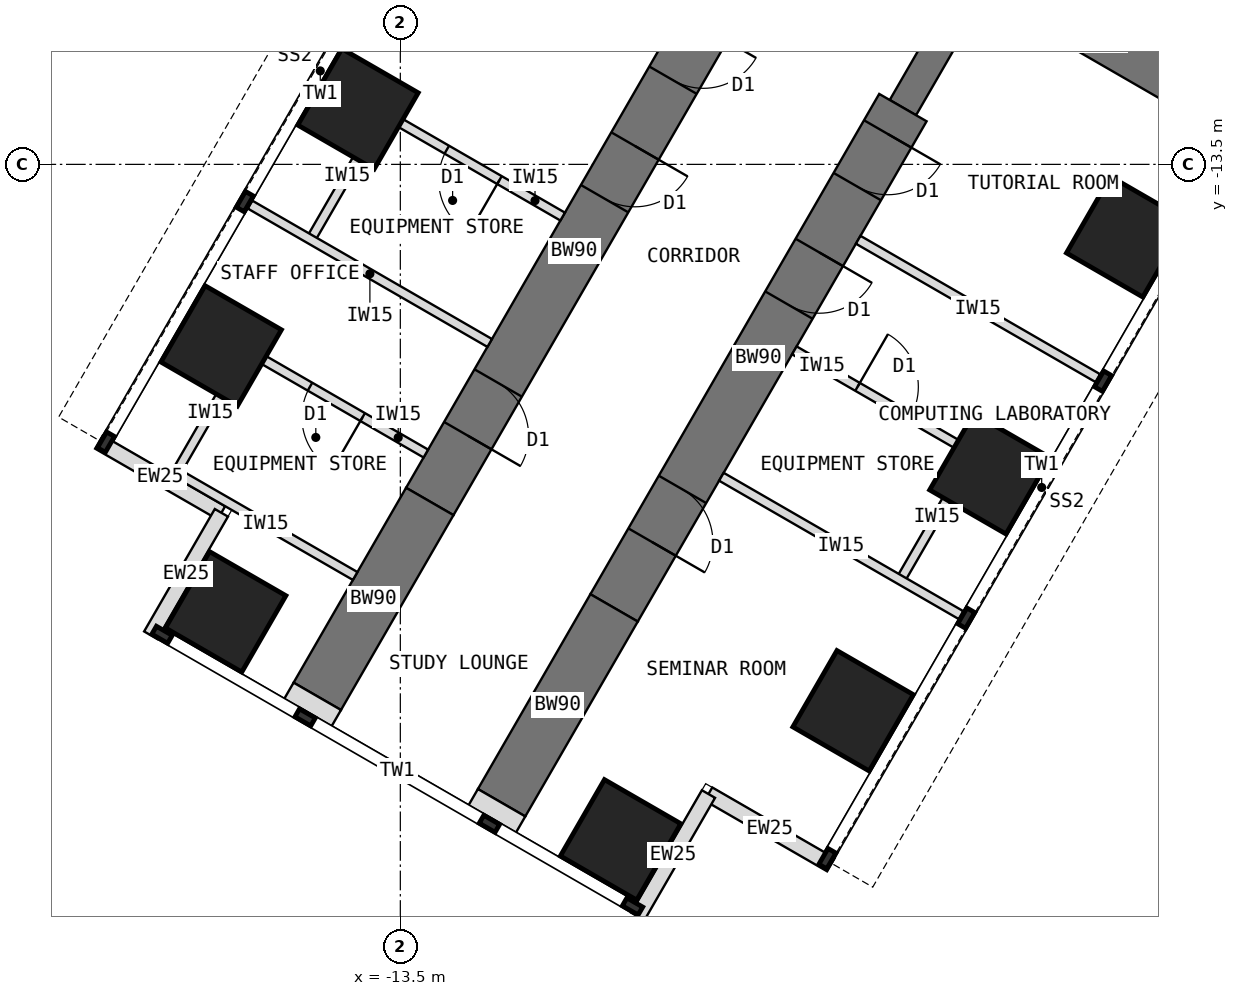
"""IFC4 building model, lengths in metres.
Left out: names, types, materials, properties, quantities, classifications, styles, units other than length and angle.
Written with IfcOpenShell. Run it as: python <this file> out.ifc"""

import sys

from ifc_helpers import new_model, si_unit, direction, frame, frame_2d, origin, origin_2d, place, context, subcontext, project, spatial, rectangle, extrude, element, fill, save


model = new_model("IFC4")
c1 = context("Model", 3, precision=1e-05, world=origin(), true_north=direction((0.0, 1.0)))
c2 = subcontext(c1, "Body", "Model", "MODEL_VIEW")
j1 = project(units=[si_unit("LENGTHUNIT", "METRE"), si_unit("PLANEANGLEUNIT", "RADIAN")], contexts=[c1])
p1 = place(None, origin())
s1 = spatial("IfcSite", under=j1, at=p1, CompositionType="ELEMENT")
p2 = place(p1, origin())
s2 = spatial("IfcBuilding", under=s1, at=p2, CompositionType="ELEMENT")
p3 = place(p2, frame((0.0, 0.0, 68.5)))
s3 = spatial("IfcBuildingStorey", under=s2, at=p3, CompositionType="ELEMENT", Elevation=68.5)
p4 = place(p3, frame((-3.939, -10.322, 0.0), z_axis=(0.0, 0.0, 1.0), x_axis=(0.866011268655, -0.500024481964, 0.0)))
e1 = element("IfcWall", 1, at=p4, inside=s3, PredefinedType="SHEAR", context=c2, shape_type="SweptSolid", body=[
    extrude(rectangle(XDim=4.548, YDim=0.7, at=frame_2d((2.274, 0.0))), origin(), (0.0, 0.0, 1.0), 4.0),
])
p5 = place(p3, frame((-3.939, -10.322, 0.0), z_axis=(0.0, 0.0, 1.0), x_axis=(-0.499918158782, -0.866072649678, 0.0)))
e2 = element("IfcWall", 2, at=p5, inside=s3, PredefinedType="SHEAR", context=c2, shape_type="SweptSolid", body=[
    extrude(rectangle(XDim=2.592, YDim=0.5, at=frame_2d((1.296, 0.0))), origin(), (0.0, 0.0, 1.0), 4.0),
])
p6 = place(p3, frame((-5.234, -12.566, 0.0), z_axis=(0.0, 0.0, 1.0), x_axis=(-0.499997557548, -0.86602681393, 0.0)))
e3 = element("IfcWall", 3, at=p6, inside=s3, PredefinedType="SHEAR", context=c2, shape_type="SweptSolid", body=[
    extrude(rectangle(XDim=9.5, YDim=0.9, at=frame_2d((4.75, 0.0))), origin(), (0.0, 0.0, 1.0), 4.0),
])
p7 = place(p6, frame((0.5, 0.0, 0.0)))
e4 = element("IfcOpeningElement", 4, at=p7, cuts=e3, PredefinedType="OPENING", context=c2, shape_type="SweptSolid", body=[
    extrude(rectangle(XDim=1.0, YDim=2.1, at=frame_2d((0.5, 1.05))), frame((0.0, 0.46, 0.0), z_axis=(0.0, -1.0, 0.0), x_axis=(1.0, 0.0, 0.0)), (0.0, 0.0, 1.0), 0.92),
])
p8 = place(p6, frame((2.75, 0.0, 0.0)))
e5 = element("IfcOpeningElement", 5, at=p8, cuts=e3, PredefinedType="OPENING", context=c2, shape_type="SweptSolid", body=[
    extrude(rectangle(XDim=1.0, YDim=2.1, at=frame_2d((0.5, 1.05))), frame((0.0, 0.46, 0.0), z_axis=(0.0, -1.0, 0.0), x_axis=(1.0, 0.0, 0.0)), (0.0, 0.0, 1.0), 0.92),
])
p9 = place(p6, frame((7.25, 0.0, 0.0)))
e6 = element("IfcOpeningElement", 6, at=p9, cuts=e3, PredefinedType="OPENING", context=c2, shape_type="SweptSolid", body=[
    extrude(rectangle(XDim=1.0, YDim=2.1, at=frame_2d((0.5, 1.05))), frame((0.0, 0.46, 0.0), z_axis=(0.0, -1.0, 0.0), x_axis=(1.0, 0.0, 0.0)), (0.0, 0.0, 1.0), 0.92),
])
p10 = place(p3, frame((-9.984, -20.794, 0.0), z_axis=(0.0, 0.0, 1.0), x_axis=(-0.500042316284, -0.866000971088, 0.0)))
e7 = element("IfcWall", 7, at=p10, inside=s3, PredefinedType="SHEAR", context=c2, shape_type="SweptSolid", body=[
    extrude(rectangle(XDim=3.7, YDim=0.9, at=frame_2d((1.85, 0.0))), origin(), (0.0, 0.0, 1.0), 4.0),
])
p11 = place(p3, frame((-8.266, -10.816, 0.0), z_axis=(0.0, 0.0, 1.0), x_axis=(-0.499997557548, -0.86602681393, 0.0)))
e8 = element("IfcWall", 8, at=p11, inside=s3, PredefinedType="SHEAR", context=c2, shape_type="SweptSolid", body=[
    extrude(rectangle(XDim=9.5, YDim=0.9, at=frame_2d((4.75, 0.0))), origin(), (0.0, 0.0, 1.0), 4.0),
])
p12 = place(p11, frame((0.5, 0.0, 0.0)))
e9 = element("IfcOpeningElement", 9, at=p12, cuts=e8, PredefinedType="OPENING", context=c2, shape_type="SweptSolid", body=[
    extrude(rectangle(XDim=1.0, YDim=2.1, at=frame_2d((0.5, 1.05))), frame((0.0, 0.46, 0.0), z_axis=(0.0, -1.0, 0.0), x_axis=(1.0, 0.0, 0.0)), (0.0, 0.0, 1.0), 0.92),
])
p13 = place(p11, frame((2.75, 0.0, 0.0)))
e10 = element("IfcOpeningElement", 10, at=p13, cuts=e8, PredefinedType="OPENING", context=c2, shape_type="SweptSolid", body=[
    extrude(rectangle(XDim=1.0, YDim=2.1, at=frame_2d((0.5, 1.05))), frame((0.0, 0.46, 0.0), z_axis=(0.0, -1.0, 0.0), x_axis=(1.0, 0.0, 0.0)), (0.0, 0.0, 1.0), 0.92),
])
p14 = place(p11, frame((7.25, 0.0, 0.0)))
e11 = element("IfcOpeningElement", 11, at=p14, cuts=e8, PredefinedType="OPENING", context=c2, shape_type="SweptSolid", body=[
    extrude(rectangle(XDim=1.0, YDim=2.1, at=frame_2d((0.5, 1.05))), frame((0.0, 0.46, 0.0), z_axis=(0.0, -1.0, 0.0), x_axis=(1.0, 0.0, 0.0)), (0.0, 0.0, 1.0), 0.92),
])
p15 = place(p3, frame((-13.016, -19.044, 0.0), z_axis=(0.0, 0.0, 1.0), x_axis=(-0.499992827086, -0.866029545028, 0.0)))
e12 = element("IfcWall", 12, at=p15, inside=s3, PredefinedType="SHEAR", context=c2, shape_type="SweptSolid", body=[
    extrude(rectangle(XDim=3.7, YDim=0.9, at=frame_2d((1.85, 0.0))), origin(), (0.0, 0.0, 1.0), 4.0),
])
for number, where, z_axis, x_axis in (
    (13, (-1.554, -14.691, 0.0), (0.0, 0.0, 1.0), (0.5, 0.866, 0.0)),
    (14, (-3.804, -18.588, 0.0), (0.0, 0.0, 1.0), (0.5, 0.866, 0.0)),
    (15, (-14.196, -12.588, 0.0), (0.0, 0.0, 1.0), (0.5, 0.866, 0.0)),
    (16, (-6.054, -22.486, 0.0), (0.0, 0.0, 1.0), (0.5, 0.866, 0.0)),
    (17, (-16.446, -16.486, 0.0), (0.0, 0.0, 1.0), (0.5, 0.866, 0.0)),
    (18, (-9.877, -24.608, 0.0), (0.0, 0.0, 1.0), (0.5, 0.866, 0.0)),
    (19, (-16.373, -20.858, 0.0), (0.0, 0.0, 1.0), (0.5, 0.866, 0.0)),
):
    element("IfcColumn", number, at=place(p3, frame(where, z_axis=z_axis, x_axis=x_axis)), inside=s3, PredefinedType="COLUMN", context=c2, shape_type="SweptSolid", body=[
        extrude(rectangle(XDim=1.45, YDim=1.45, at=origin_2d()), origin(), (0.0, 0.0, 1.0), 4.0),
    ])
for number, where, z_axis, x_axis in (
    (20, (-6.419, -25.017, 0.0), (0.0, 0.0, 1.0), (-0.866, 0.5, 0.0)),
    (21, (-8.432, -23.855, 0.0), (0.0, 0.0, 1.0), (-0.5, -0.866, 0.0)),
    (22, (-18.456, -18.067, 0.0), (0.0, 0.0, 1.0), (0.866, -0.5, 0.0)),
    (23, (-16.443, -19.23, 0.0), (0.0, 0.0, 1.0), (-0.5, -0.866, 0.0)),
):
    element("IfcWall", number, at=place(p3, frame(where, z_axis=z_axis, x_axis=x_axis)), inside=s3, PredefinedType="STANDARD", context=c2, shape_type="SweptSolid", body=[
        extrude(rectangle(XDim=2.325, YDim=0.25, at=frame_2d((1.163, 0.0))), origin(), (0.0, 0.0, 1.0), 3.8),
    ])
for number, where, z_axis, x_axis in (
    (24, (-11.834, -23.998, 0.0), (0.0, 0.0, 1.0), (-0.5, -0.866, 0.0)),
    (25, (-14.865, -22.248, 0.0), (0.0, 0.0, 1.0), (-0.5, -0.866, 0.0)),
):
    element("IfcWall", number, at=place(p3, frame(where, z_axis=z_axis, x_axis=x_axis)), inside=s3, PredefinedType="PARTITIONING", context=c2, shape_type="SweptSolid", body=[
        extrude(rectangle(XDim=0.31, YDim=0.9, at=frame_2d((0.155, 0.0))), origin(), (0.0, 0.0, 1.0), 3.8),
    ])
for number, where, z_axis, x_axis in (
    (26, (-5.97, -14.74, 0.0), (0.0, 0.0, 1.0), (0.866, -0.5, 0.0)),
    (27, (-8.22, -18.637, 0.0), (0.0, 0.0, 1.0), (0.866, -0.5, 0.0)),
):
    element("IfcWall", number, at=place(p3, frame(where, z_axis=z_axis, x_axis=x_axis)), inside=s3, PredefinedType="PARTITIONING", context=c2, shape_type="SweptSolid", body=[
        extrude(rectangle(XDim=4.55, YDim=0.15, at=frame_2d((2.275, 0.0))), origin(), (0.0, 0.0, 1.0), 3.8),
    ])
p16 = place(p3, frame((-4.075, -18.259, 0.0), z_axis=(0.0, 0.0, 1.0), x_axis=(-0.500001309137, -0.866024647952, 0.0)))
e28 = element("IfcWall", 28, at=p16, inside=s3, PredefinedType="PARTITIONING", context=c2, shape_type="SweptSolid", body=[
    extrude(rectangle(XDim=2.4, YDim=0.15, at=frame_2d((1.2, 0.0))), origin(), (0.0, 0.0, 1.0), 3.8),
])
p17 = place(p3, frame((-7.02, -16.559, 0.0), z_axis=(0.0, 0.0, 1.0), x_axis=(0.866038511948, -0.499977295307, 0.0)))
e29 = element("IfcWall", 29, at=p17, inside=s3, PredefinedType="PARTITIONING", context=c2, shape_type="SweptSolid", body=[
    extrude(rectangle(XDim=3.4, YDim=0.15, at=frame_2d((1.7, 0.0))), origin(), (0.0, 0.0, 1.0), 3.8),
])
p18 = place(p17, frame((1.2, 0.0, 0.0)))
e30 = element("IfcOpeningElement", 30, at=p18, cuts=e29, PredefinedType="OPENING", context=c2, shape_type="SweptSolid", body=[
    extrude(rectangle(XDim=1.0, YDim=2.1, at=frame_2d((0.5, 1.05))), frame((0.0, 0.085, 0.0), z_axis=(0.0, -1.0, 0.0), x_axis=(1.0, 0.0, 0.0)), (0.0, 0.0, 1.0), 0.17),
])
p19 = place(p3, frame((-12.03, -16.437, 0.0), z_axis=(0.0, 0.0, 1.0), x_axis=(-0.866035472144, 0.499982560684, 0.0)))
e31 = element("IfcWall", 31, at=p19, inside=s3, PredefinedType="PARTITIONING", context=c2, shape_type="SweptSolid", body=[
    extrude(rectangle(XDim=4.55, YDim=0.15, at=frame_2d((2.275, 0.0))), origin(), (0.0, 0.0, 1.0), 3.8),
])
p20 = place(p3, frame((-13.775, -12.658, 0.0), z_axis=(0.0, 0.0, 1.0), x_axis=(-0.500033551112, -0.866006032174, 0.0)))
e32 = element("IfcWall", 32, at=p20, inside=s3, PredefinedType="PARTITIONING", context=c2, shape_type="SweptSolid", body=[
    extrude(rectangle(XDim=2.4, YDim=0.15, at=frame_2d((1.2, 0.0))), origin(), (0.0, 0.0, 1.0), 3.8),
])
p21 = place(p3, frame((-10.83, -14.359, 0.0), z_axis=(0.0, 0.0, 1.0), x_axis=(-0.865989465428, 0.500062241894, 0.0)))
e33 = element("IfcWall", 33, at=p21, inside=s3, PredefinedType="PARTITIONING", context=c2, shape_type="SweptSolid", body=[
    extrude(rectangle(XDim=3.4, YDim=0.15, at=frame_2d((1.7, 0.0))), origin(), (0.0, 0.0, 1.0), 3.8),
])
p22 = place(p21, frame((1.2, 0.0, 0.0)))
e34 = element("IfcOpeningElement", 34, at=p22, cuts=e33, PredefinedType="OPENING", context=c2, shape_type="SweptSolid", body=[
    extrude(rectangle(XDim=1.0, YDim=2.1, at=frame_2d((0.5, 1.05))), frame((0.0, 0.085, 0.0), z_axis=(0.0, -1.0, 0.0), x_axis=(1.0, 0.0, 0.0)), (0.0, 0.0, 1.0), 0.17),
])
p23 = place(p3, frame((-16.025, -16.556, 0.0), z_axis=(0.0, 0.0, 1.0), x_axis=(-0.500077600433, -0.865980596518, 0.0)))
e35 = element("IfcWall", 35, at=p23, inside=s3, PredefinedType="PARTITIONING", context=c2, shape_type="SweptSolid", body=[
    extrude(rectangle(XDim=2.4, YDim=0.15, at=frame_2d((1.2, 0.0))), origin(), (0.0, 0.0, 1.0), 3.8),
])
p24 = place(p3, frame((-13.08, -18.256, 0.0), z_axis=(0.0, 0.0, 1.0), x_axis=(-0.866020560687, 0.500008388397, 0.0)))
e36 = element("IfcWall", 36, at=p24, inside=s3, PredefinedType="PARTITIONING", context=c2, shape_type="SweptSolid", body=[
    extrude(rectangle(XDim=3.4, YDim=0.15, at=frame_2d((1.7, 0.0))), origin(), (0.0, 0.0, 1.0), 3.8),
])
p25 = place(p24, frame((1.2, 0.0, 0.0)))
e37 = element("IfcOpeningElement", 37, at=p25, cuts=e36, PredefinedType="OPENING", context=c2, shape_type="SweptSolid", body=[
    extrude(rectangle(XDim=1.0, YDim=2.1, at=frame_2d((0.5, 1.05))), frame((0.0, 0.085, 0.0), z_axis=(0.0, -1.0, 0.0), x_axis=(1.0, 0.0, 0.0)), (0.0, 0.0, 1.0), 0.17),
])
p26 = place(p3, frame((-14.243, -20.269, 0.0), z_axis=(0.0, 0.0, 1.0), x_axis=(-0.866007419912, 0.500031147688, 0.0)))
e38 = element("IfcWall", 38, at=p26, inside=s3, PredefinedType="PARTITIONING", context=c2, shape_type="SweptSolid", body=[
    extrude(rectangle(XDim=3.4, YDim=0.15, at=frame_2d((1.7, 0.0))), origin(), (0.0, 0.0, 1.0), 3.8),
])
p27 = place(p18, origin())
e39 = element("IfcDoor", 39, at=p27, inside=s3, OperationType="SINGLE_SWING_LEFT", PredefinedType="DOOR", context=c2, shape_type="SweptSolid", body=[
    extrude(rectangle(XDim=1.0, YDim=2.1, at=frame_2d((0.5, 1.05))), frame((0.0, 0.025, 0.0), z_axis=(0.0, -1.0, 0.0), x_axis=(1.0, 0.0, 0.0)), (0.0, 0.0, 1.0), 0.05),
])
fill(e30, e39)
p28 = place(p22, origin())
e40 = element("IfcDoor", 40, at=p28, inside=s3, OperationType="SINGLE_SWING_LEFT", PredefinedType="DOOR", context=c2, shape_type="SweptSolid", body=[
    extrude(rectangle(XDim=1.0, YDim=2.1, at=frame_2d((0.5, 1.05))), frame((0.0, 0.025, 0.0), z_axis=(0.0, -1.0, 0.0), x_axis=(1.0, 0.0, 0.0)), (0.0, 0.0, 1.0), 0.05),
])
fill(e34, e40)
p29 = place(p25, origin())
e41 = element("IfcDoor", 41, at=p29, inside=s3, OperationType="SINGLE_SWING_LEFT", PredefinedType="DOOR", context=c2, shape_type="SweptSolid", body=[
    extrude(rectangle(XDim=1.0, YDim=2.1, at=frame_2d((0.5, 1.05))), frame((0.0, 0.025, 0.0), z_axis=(0.0, -1.0, 0.0), x_axis=(1.0, 0.0, 0.0)), (0.0, 0.0, 1.0), 0.05),
])
fill(e37, e41)
p30 = place(p7, origin())
e42 = element("IfcDoor", 42, at=p30, inside=s3, OperationType="SINGLE_SWING_LEFT", PredefinedType="DOOR", context=c2, shape_type="SweptSolid", body=[
    extrude(rectangle(XDim=0.92, YDim=2.06, at=frame_2d((0.5, 1.03))), frame((0.0, 0.025, 0.0), z_axis=(0.0, -1.0, 0.0), x_axis=(1.0, 0.0, 0.0)), (0.0, 0.0, 1.0), 0.05),
    extrude(rectangle(XDim=0.04, YDim=2.1, at=frame_2d((0.02, 1.05))), frame((0.0, 0.45, 0.0), z_axis=(0.0, -1.0, 0.0), x_axis=(1.0, 0.0, 0.0)), (0.0, 0.0, 1.0), 0.899),
    extrude(rectangle(XDim=0.04, YDim=2.1, at=frame_2d((0.98, 1.05))), frame((0.0, 0.45, 0.0), z_axis=(0.0, -1.0, 0.0), x_axis=(1.0, 0.0, 0.0)), (0.0, 0.0, 1.0), 0.899),
    extrude(rectangle(XDim=0.92, YDim=0.04, at=frame_2d((0.5, 2.08))), frame((0.0, 0.45, 0.0), z_axis=(0.0, -1.0, 0.0), x_axis=(1.0, 0.0, 0.0)), (0.0, 0.0, 1.0), 0.899),
])
fill(e4, e42)
p31 = place(p8, origin())
e43 = element("IfcDoor", 43, at=p31, inside=s3, OperationType="SINGLE_SWING_LEFT", PredefinedType="DOOR", context=c2, shape_type="SweptSolid", body=[
    extrude(rectangle(XDim=0.92, YDim=2.06, at=frame_2d((0.5, 1.03))), frame((0.0, 0.025, 0.0), z_axis=(0.0, -1.0, 0.0), x_axis=(1.0, 0.0, 0.0)), (0.0, 0.0, 1.0), 0.05),
    extrude(rectangle(XDim=0.04, YDim=2.1, at=frame_2d((0.02, 1.05))), frame((0.0, 0.45, 0.0), z_axis=(0.0, -1.0, 0.0), x_axis=(1.0, 0.0, 0.0)), (0.0, 0.0, 1.0), 0.899),
    extrude(rectangle(XDim=0.04, YDim=2.1, at=frame_2d((0.98, 1.05))), frame((0.0, 0.45, 0.0), z_axis=(0.0, -1.0, 0.0), x_axis=(1.0, 0.0, 0.0)), (0.0, 0.0, 1.0), 0.899),
    extrude(rectangle(XDim=0.92, YDim=0.04, at=frame_2d((0.5, 2.08))), frame((0.0, 0.45, 0.0), z_axis=(0.0, -1.0, 0.0), x_axis=(1.0, 0.0, 0.0)), (0.0, 0.0, 1.0), 0.899),
])
fill(e5, e43)
p32 = place(p9, origin())
e44 = element("IfcDoor", 44, at=p32, inside=s3, OperationType="SINGLE_SWING_RIGHT", PredefinedType="DOOR", context=c2, shape_type="SweptSolid", body=[
    extrude(rectangle(XDim=0.92, YDim=2.06, at=frame_2d((0.5, 1.03))), frame((0.0, 0.025, 0.0), z_axis=(0.0, -1.0, 0.0), x_axis=(1.0, 0.0, 0.0)), (0.0, 0.0, 1.0), 0.05),
    extrude(rectangle(XDim=0.04, YDim=2.1, at=frame_2d((0.02, 1.05))), frame((0.0, 0.45, 0.0), z_axis=(0.0, -1.0, 0.0), x_axis=(1.0, 0.0, 0.0)), (0.0, 0.0, 1.0), 0.899),
    extrude(rectangle(XDim=0.04, YDim=2.1, at=frame_2d((0.98, 1.05))), frame((0.0, 0.45, 0.0), z_axis=(0.0, -1.0, 0.0), x_axis=(1.0, 0.0, 0.0)), (0.0, 0.0, 1.0), 0.899),
    extrude(rectangle(XDim=0.92, YDim=0.04, at=frame_2d((0.5, 2.08))), frame((0.0, 0.45, 0.0), z_axis=(0.0, -1.0, 0.0), x_axis=(1.0, 0.0, 0.0)), (0.0, 0.0, 1.0), 0.899),
])
fill(e6, e44)
p33 = place(p12, origin())
e45 = element("IfcDoor", 45, at=p33, inside=s3, OperationType="SINGLE_SWING_LEFT", PredefinedType="DOOR", context=c2, shape_type="SweptSolid", body=[
    extrude(rectangle(XDim=0.92, YDim=2.06, at=frame_2d((0.5, 1.03))), frame((0.0, 0.025, 0.0), z_axis=(0.0, -1.0, 0.0), x_axis=(1.0, 0.0, 0.0)), (0.0, 0.0, 1.0), 0.05),
    extrude(rectangle(XDim=0.04, YDim=2.1, at=frame_2d((0.02, 1.05))), frame((0.0, 0.45, 0.0), z_axis=(0.0, -1.0, 0.0), x_axis=(1.0, 0.0, 0.0)), (0.0, 0.0, 1.0), 0.899),
    extrude(rectangle(XDim=0.04, YDim=2.1, at=frame_2d((0.98, 1.05))), frame((0.0, 0.45, 0.0), z_axis=(0.0, -1.0, 0.0), x_axis=(1.0, 0.0, 0.0)), (0.0, 0.0, 1.0), 0.899),
    extrude(rectangle(XDim=0.92, YDim=0.04, at=frame_2d((0.5, 2.08))), frame((0.0, 0.45, 0.0), z_axis=(0.0, -1.0, 0.0), x_axis=(1.0, 0.0, 0.0)), (0.0, 0.0, 1.0), 0.899),
])
fill(e9, e45)
p34 = place(p13, origin())
e46 = element("IfcDoor", 46, at=p34, inside=s3, OperationType="SINGLE_SWING_LEFT", PredefinedType="DOOR", context=c2, shape_type="SweptSolid", body=[
    extrude(rectangle(XDim=0.92, YDim=2.06, at=frame_2d((0.5, 1.03))), frame((0.0, 0.025, 0.0), z_axis=(0.0, -1.0, 0.0), x_axis=(1.0, 0.0, 0.0)), (0.0, 0.0, 1.0), 0.05),
    extrude(rectangle(XDim=0.04, YDim=2.1, at=frame_2d((0.02, 1.05))), frame((0.0, 0.45, 0.0), z_axis=(0.0, -1.0, 0.0), x_axis=(1.0, 0.0, 0.0)), (0.0, 0.0, 1.0), 0.899),
    extrude(rectangle(XDim=0.04, YDim=2.1, at=frame_2d((0.98, 1.05))), frame((0.0, 0.45, 0.0), z_axis=(0.0, -1.0, 0.0), x_axis=(1.0, 0.0, 0.0)), (0.0, 0.0, 1.0), 0.899),
    extrude(rectangle(XDim=0.92, YDim=0.04, at=frame_2d((0.5, 2.08))), frame((0.0, 0.45, 0.0), z_axis=(0.0, -1.0, 0.0), x_axis=(1.0, 0.0, 0.0)), (0.0, 0.0, 1.0), 0.899),
])
fill(e10, e46)
p35 = place(p14, origin())
e47 = element("IfcDoor", 47, at=p35, inside=s3, OperationType="SINGLE_SWING_RIGHT", PredefinedType="DOOR", context=c2, shape_type="SweptSolid", body=[
    extrude(rectangle(XDim=0.92, YDim=2.06, at=frame_2d((0.5, 1.03))), frame((0.0, 0.025, 0.0), z_axis=(0.0, -1.0, 0.0), x_axis=(1.0, 0.0, 0.0)), (0.0, 0.0, 1.0), 0.05),
    extrude(rectangle(XDim=0.04, YDim=2.1, at=frame_2d((0.02, 1.05))), frame((0.0, 0.45, 0.0), z_axis=(0.0, -1.0, 0.0), x_axis=(1.0, 0.0, 0.0)), (0.0, 0.0, 1.0), 0.899),
    extrude(rectangle(XDim=0.04, YDim=2.1, at=frame_2d((0.98, 1.05))), frame((0.0, 0.45, 0.0), z_axis=(0.0, -1.0, 0.0), x_axis=(1.0, 0.0, 0.0)), (0.0, 0.0, 1.0), 0.899),
    extrude(rectangle(XDim=0.92, YDim=0.04, at=frame_2d((0.5, 2.08))), frame((0.0, 0.45, 0.0), z_axis=(0.0, -1.0, 0.0), x_axis=(1.0, 0.0, 0.0)), (0.0, 0.0, 1.0), 0.899),
])
fill(e11, e47)
save(model, sys.argv[1])
